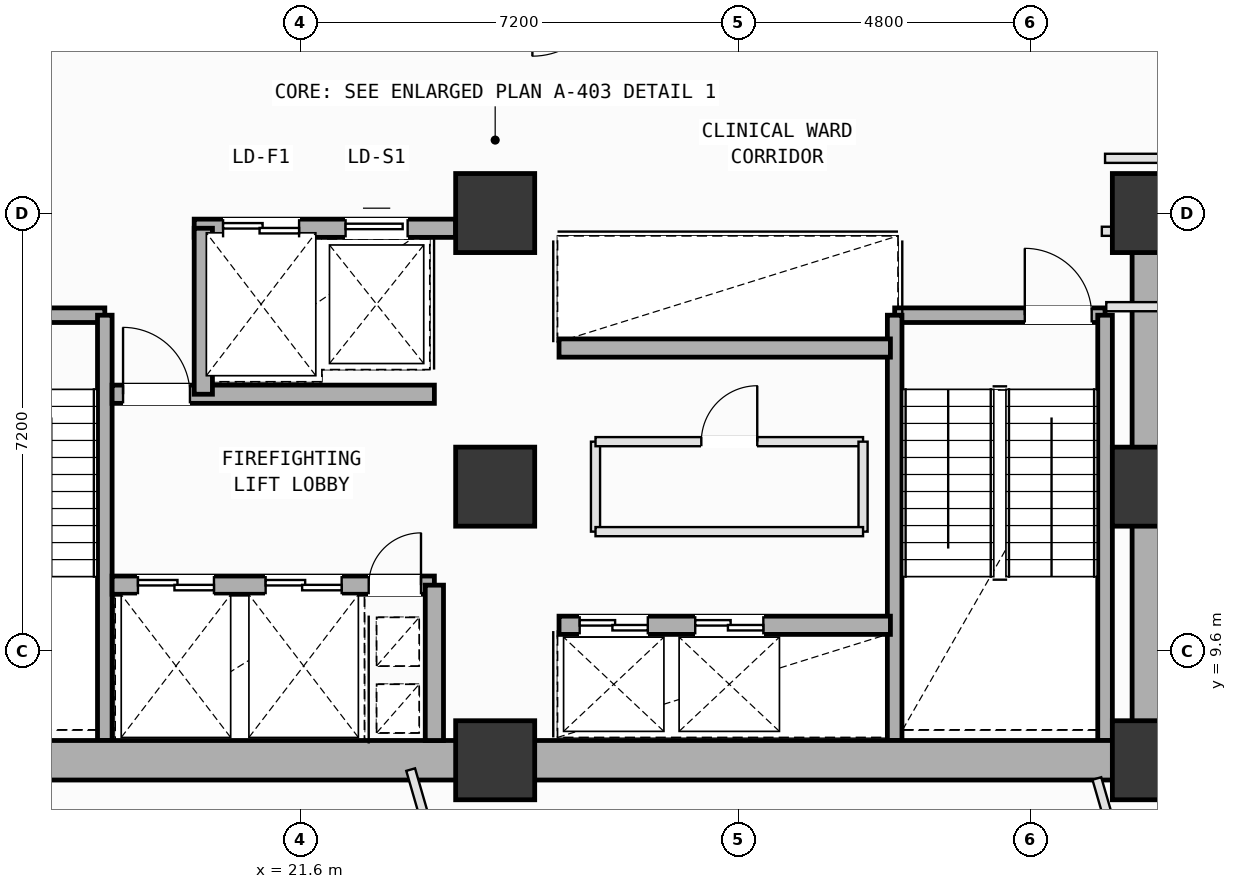
"""IFC4 building model, lengths in metres.
Left out: names, types, materials, properties, quantities, classifications, styles, units other than length and angle.
Written with IfcOpenShell. Run it as: python <this file> out.ifc"""

import sys

from ifc_helpers import new_model, si_unit, direction, frame, frame_2d, origin, origin_2d, place, context, subcontext, project, spatial, rectangle, extrude, element, fill, save


model = new_model("IFC4")
c1 = context("Model", 3, precision=1e-05, world=origin(), true_north=direction((0.0, 1.0)))
c2 = subcontext(c1, "Body", "Model", "MODEL_VIEW")
j1 = project(units=[si_unit("LENGTHUNIT", "METRE"), si_unit("PLANEANGLEUNIT", "RADIAN")], contexts=[c1])
p1 = place(None, origin())
s1 = spatial("IfcSite", under=j1, at=p1, CompositionType="ELEMENT")
p2 = place(p1, origin())
s2 = spatial("IfcBuilding", under=s1, at=p2, CompositionType="ELEMENT")
p3 = place(p2, frame((0.0, 0.0, 92.4)))
s3 = spatial("IfcBuildingStorey", under=s2, at=p3, CompositionType="ELEMENT", Elevation=92.4)
for number, where, z_axis, x_axis in (
    (1, (24.8, 7.8, 0.0), (0.0, 0.0, 1.0), (1.0, 0.0, 0.0)),
    (2, (24.8, 12.3, 0.0), (0.0, 0.0, 1.0), (1.0, 0.0, 0.0)),
    (3, (24.8, 16.8, 0.0), (0.0, 0.0, 1.0), (1.0, 0.0, 0.0)),
    (4, (35.6, 7.8, 0.0), (0.0, 0.0, 1.0), (1.0, 0.0, 0.0)),
    (5, (35.6, 12.3, 0.0), (0.0, 0.0, 1.0), (1.0, 0.0, 0.0)),
    (6, (35.6, 16.8, 0.0), (0.0, 0.0, 1.0), (1.0, 0.0, 0.0)),
):
    element("IfcColumn", number, at=place(p3, frame(where, z_axis=z_axis, x_axis=x_axis)), inside=s3, PredefinedType="COLUMN", context=c2, shape_type="SweptSolid", body=[
        extrude(rectangle(XDim=1.3, YDim=1.3, at=origin_2d()), origin(), (0.0, 0.0, 1.0), 4.0),
    ])
p4 = place(p3, frame((14.92, 15.12, 0.0), z_axis=(0.0, 0.0, 1.0), x_axis=(1.0, 0.0, 0.0)))
e7 = element("IfcWall", 7, at=p4, inside=s3, PredefinedType="SOLIDWALL", context=c2, shape_type="SweptSolid", body=[
    extrude(rectangle(XDim=3.46, YDim=0.24, at=frame_2d((1.73, 0.0))), origin(), (0.0, 0.0, 1.0), 3.78),
])
p5 = place(p4, frame((0.22, 0.0, 0.0)))
e8 = element("IfcOpeningElement", 8, at=p5, cuts=e7, PredefinedType="OPENING", context=c2, shape_type="SweptSolid", body=[
    extrude(rectangle(XDim=1.1, YDim=2.15, at=frame_2d((0.55, 1.075))), frame((0.0, 0.13, 0.0), z_axis=(0.0, -1.0, 0.0), x_axis=(1.0, 0.0, 0.0)), (0.0, 0.0, 1.0), 0.26),
])
p6 = place(p3, frame((18.38, 15.12, 0.0), z_axis=(0.0, 0.0, 1.0), x_axis=(0.0, -1.0, 0.0)))
e9 = element("IfcWall", 9, at=p6, inside=s3, PredefinedType="SOLIDWALL", context=c2, shape_type="SweptSolid", body=[
    extrude(rectangle(XDim=6.995, YDim=0.24, at=frame_2d((3.498, 0.0))), origin(), (0.0, 0.0, 1.0), 3.78),
])
p7 = place(p3, frame((31.37, 15.12, 0.0), z_axis=(0.0, 0.0, 1.0), x_axis=(1.0, 0.0, 0.0)))
e10 = element("IfcWall", 10, at=p7, inside=s3, PredefinedType="SOLIDWALL", context=c2, shape_type="SweptSolid", body=[
    extrude(rectangle(XDim=3.46, YDim=0.24, at=frame_2d((1.73, 0.0))), origin(), (0.0, 0.0, 1.0), 3.78),
])
p8 = place(p7, frame((2.14, 0.0, 0.0)))
e11 = element("IfcOpeningElement", 11, at=p8, cuts=e10, PredefinedType="OPENING", context=c2, shape_type="SweptSolid", body=[
    extrude(rectangle(XDim=1.1, YDim=2.15, at=frame_2d((0.55, 1.075))), frame((0.0, 0.13, 0.0), z_axis=(0.0, -1.0, 0.0), x_axis=(1.0, 0.0, 0.0)), (0.0, 0.0, 1.0), 0.26),
])
for number, where, z_axis, x_axis in (
    (12, (34.83, 15.12, 0.0), (0.0, 0.0, 1.0), (0.0, -1.0, 0.0)),
    (13, (31.37, 8.125, 0.0), (0.0, 0.0, 1.0), (0.0, 1.0, 0.0)),
):
    element("IfcWall", number, at=place(p3, frame(where, z_axis=z_axis, x_axis=x_axis)), inside=s3, PredefinedType="SOLIDWALL", context=c2, shape_type="SweptSolid", body=[
        extrude(rectangle(XDim=6.995, YDim=0.24, at=frame_2d((3.498, 0.0))), origin(), (0.0, 0.0, 1.0), 3.78),
    ])
for number, where, z_axis, x_axis in (
    (14, (14.0, 7.8, 0.0), (0.0, 0.0, 1.0), (1.0, 0.0, 0.0)),
    (15, (24.8, 7.8, 0.0), (0.0, 0.0, 1.0), (1.0, 0.0, 0.0)),
):
    element("IfcWall", number, at=place(p3, frame(where, z_axis=z_axis, x_axis=x_axis)), inside=s3, PredefinedType="SHEAR", context=c2, shape_type="SweptSolid", body=[
        extrude(rectangle(XDim=10.8, YDim=0.65, at=frame_2d((5.4, 0.0))), origin(), (0.0, 0.0, 1.0), 3.78),
    ])
p9 = place(p3, frame((35.6, 7.8, 0.0), z_axis=(0.0, 0.0, 1.0), x_axis=(0.0, 1.0, 0.0)))
e16 = element("IfcWall", 16, at=p9, inside=s3, PredefinedType="SHEAR", context=c2, shape_type="SweptSolid", body=[
    extrude(rectangle(XDim=9.0, YDim=0.65, at=frame_2d((4.5, 0.0))), origin(), (0.0, 0.0, 1.0), 3.78),
])
p10 = place(p3, frame((19.85, 16.55, 0.0), z_axis=(0.0, 0.0, 1.0), x_axis=(1.0, 0.0, 0.0)))
e17 = element("IfcWall", 17, at=p10, inside=s3, PredefinedType="SOLIDWALL", context=c2, shape_type="SweptSolid", body=[
    extrude(rectangle(XDim=4.3, YDim=0.3, at=frame_2d((2.15, 0.0))), origin(), (0.0, 0.0, 1.0), 3.78),
])
p11 = place(p10, frame((0.475, 0.0, 0.0)))
e18 = element("IfcOpeningElement", 18, at=p11, cuts=e17, PredefinedType="OPENING", context=c2, shape_type="SweptSolid", body=[
    extrude(rectangle(XDim=1.25, YDim=2.18, at=frame_2d((0.625, 1.09))), frame((0.0, 0.16, 0.0), z_axis=(0.0, -1.0, 0.0), x_axis=(1.0, 0.0, 0.0)), (0.0, 0.0, 1.0), 0.32),
])
p12 = place(p10, frame((2.49, 0.0, 0.0)))
e19 = element("IfcOpeningElement", 19, at=p12, cuts=e17, PredefinedType="OPENING", context=c2, shape_type="SweptSolid", body=[
    extrude(rectangle(XDim=1.02, YDim=2.12, at=frame_2d((0.51, 1.06))), frame((0.0, 0.16, 0.0), z_axis=(0.0, -1.0, 0.0), x_axis=(1.0, 0.0, 0.0)), (0.0, 0.0, 1.0), 0.32),
])
p13 = place(p3, frame((18.5, 10.68, 0.0), z_axis=(0.0, 0.0, 1.0), x_axis=(1.0, 0.0, 0.0)))
e20 = element("IfcWall", 20, at=p13, inside=s3, PredefinedType="SOLIDWALL", context=c2, shape_type="SweptSolid", body=[
    extrude(rectangle(XDim=5.3, YDim=0.3, at=frame_2d((2.65, 0.0))), origin(), (0.0, 0.0, 1.0), 3.78),
])
p14 = place(p13, frame((4.22, 0.0, 0.0)))
e21 = element("IfcOpeningElement", 21, at=p14, cuts=e20, PredefinedType="OPENING", context=c2, shape_type="SweptSolid", body=[
    extrude(rectangle(XDim=0.86, YDim=2.06, at=frame_2d((0.43, 1.03))), frame((0.0, 0.16, 0.0), z_axis=(0.0, -1.0, 0.0), x_axis=(1.0, 0.0, 0.0)), (0.0, 0.0, 1.0), 0.32),
])
p15 = place(p13, frame((0.425, 0.0, 0.0)))
e22 = element("IfcOpeningElement", 22, at=p15, cuts=e20, PredefinedType="OPENING", context=c2, shape_type="SweptSolid", body=[
    extrude(rectangle(XDim=1.25, YDim=2.18, at=frame_2d((0.625, 1.09))), frame((0.0, 0.16, 0.0), z_axis=(0.0, -1.0, 0.0), x_axis=(1.0, 0.0, 0.0)), (0.0, 0.0, 1.0), 0.32),
])
p16 = place(p13, frame((2.525, 0.0, 0.0)))
e23 = element("IfcOpeningElement", 23, at=p16, cuts=e20, PredefinedType="OPENING", context=c2, shape_type="SweptSolid", body=[
    extrude(rectangle(XDim=1.25, YDim=2.18, at=frame_2d((0.625, 1.09))), frame((0.0, 0.16, 0.0), z_axis=(0.0, -1.0, 0.0), x_axis=(1.0, 0.0, 0.0)), (0.0, 0.0, 1.0), 0.32),
])
p17 = place(p3, frame((18.5, 13.82, 0.0), z_axis=(0.0, 0.0, 1.0), x_axis=(1.0, 0.0, 0.0)))
e24 = element("IfcWall", 24, at=p17, inside=s3, PredefinedType="SOLIDWALL", context=c2, shape_type="SweptSolid", body=[
    extrude(rectangle(XDim=5.3, YDim=0.3, at=frame_2d((2.65, 0.0))), origin(), (0.0, 0.0, 1.0), 3.78),
])
p18 = place(p17, frame((0.18, 0.0, 0.0)))
e25 = element("IfcOpeningElement", 25, at=p18, cuts=e24, PredefinedType="OPENING", context=c2, shape_type="SweptSolid", body=[
    extrude(rectangle(XDim=1.1, YDim=2.15, at=frame_2d((0.55, 1.075))), frame((0.0, 0.16, 0.0), z_axis=(0.0, -1.0, 0.0), x_axis=(1.0, 0.0, 0.0)), (0.0, 0.0, 1.0), 0.32),
])
p19 = place(p3, frame((23.8, 8.125, 0.0), z_axis=(0.0, 0.0, 1.0), x_axis=(0.0, 1.0, 0.0)))
e26 = element("IfcWall", 26, at=p19, inside=s3, PredefinedType="SOLIDWALL", context=c2, shape_type="SweptSolid", body=[
    extrude(rectangle(XDim=2.555, YDim=0.3, at=frame_2d((1.277, 0.0))), origin(), (0.0, 0.0, 1.0), 3.78),
])
p20 = place(p3, frame((20.0, 13.82, 0.0), z_axis=(0.0, 0.0, 1.0), x_axis=(0.0, 1.0, 0.0)))
e27 = element("IfcWall", 27, at=p20, inside=s3, PredefinedType="SOLIDWALL", context=c2, shape_type="SweptSolid", body=[
    extrude(rectangle(XDim=2.73, YDim=0.3, at=frame_2d((1.365, 0.0))), origin(), (0.0, 0.0, 1.0), 3.78),
])
p21 = place(p3, frame((25.85, 10.02, 0.0), z_axis=(0.0, 0.0, 1.0), x_axis=(1.0, 0.0, 0.0)))
e28 = element("IfcWall", 28, at=p21, inside=s3, PredefinedType="SOLIDWALL", context=c2, shape_type="SweptSolid", body=[
    extrude(rectangle(XDim=5.45, YDim=0.3, at=frame_2d((2.725, 0.0))), origin(), (0.0, 0.0, 1.0), 3.78),
])
p22 = place(p21, frame((0.34, 0.0, 0.0)))
e29 = element("IfcOpeningElement", 29, at=p22, cuts=e28, PredefinedType="OPENING", context=c2, shape_type="SweptSolid", body=[
    extrude(rectangle(XDim=1.12, YDim=2.15, at=frame_2d((0.56, 1.075))), frame((0.0, 0.16, 0.0), z_axis=(0.0, -1.0, 0.0), x_axis=(1.0, 0.0, 0.0)), (0.0, 0.0, 1.0), 0.32),
])
p23 = place(p21, frame((2.24, 0.0, 0.0)))
e30 = element("IfcOpeningElement", 30, at=p23, cuts=e28, PredefinedType="OPENING", context=c2, shape_type="SweptSolid", body=[
    extrude(rectangle(XDim=1.12, YDim=2.15, at=frame_2d((0.56, 1.075))), frame((0.0, 0.16, 0.0), z_axis=(0.0, -1.0, 0.0), x_axis=(1.0, 0.0, 0.0)), (0.0, 0.0, 1.0), 0.32),
])
p24 = place(p3, frame((25.85, 14.58, 0.0), z_axis=(0.0, 0.0, 1.0), x_axis=(1.0, 0.0, 0.0)))
e31 = element("IfcWall", 31, at=p24, inside=s3, PredefinedType="SOLIDWALL", context=c2, shape_type="SweptSolid", body=[
    extrude(rectangle(XDim=5.45, YDim=0.3, at=frame_2d((2.725, 0.0))), origin(), (0.0, 0.0, 1.0), 3.78),
])
p25 = place(p3, frame((26.45, 11.56, 0.0), z_axis=(0.0, 0.0, 1.0), x_axis=(0.0, 1.0, 0.0)))
e32 = element("IfcWall", 32, at=p25, inside=s3, PredefinedType="PARTITIONING", context=c2, shape_type="SweptSolid", body=[
    extrude(rectangle(XDim=1.48, YDim=0.15, at=frame_2d((0.74, 0.0))), origin(), (0.0, 0.0, 1.0), 3.78),
])
p26 = place(p3, frame((26.45, 13.04, 0.0), z_axis=(0.0, 0.0, 1.0), x_axis=(1.0, 0.0, 0.0)))
e33 = element("IfcWall", 33, at=p26, inside=s3, PredefinedType="PARTITIONING", context=c2, shape_type="SweptSolid", body=[
    extrude(rectangle(XDim=4.4, YDim=0.15, at=frame_2d((2.2, 0.0))), origin(), (0.0, 0.0, 1.0), 3.78),
])
p27 = place(p26, frame((1.74, 0.0, 0.0)))
e34 = element("IfcOpeningElement", 34, at=p27, cuts=e33, PredefinedType="OPENING", context=c2, shape_type="SweptSolid", body=[
    extrude(rectangle(XDim=0.92, YDim=2.1, at=frame_2d((0.46, 1.05))), frame((0.0, 0.085, 0.0), z_axis=(0.0, -1.0, 0.0), x_axis=(1.0, 0.0, 0.0)), (0.0, 0.0, 1.0), 0.17),
])
p28 = place(p3, frame((30.85, 13.04, 0.0), z_axis=(0.0, 0.0, 1.0), x_axis=(0.0, -1.0, 0.0)))
e35 = element("IfcWall", 35, at=p28, inside=s3, PredefinedType="PARTITIONING", context=c2, shape_type="SweptSolid", body=[
    extrude(rectangle(XDim=1.48, YDim=0.15, at=frame_2d((0.74, 0.0))), origin(), (0.0, 0.0, 1.0), 3.78),
])
p29 = place(p3, frame((30.85, 11.56, 0.0), z_axis=(0.0, 0.0, 1.0), x_axis=(-1.0, 0.0, 0.0)))
e36 = element("IfcWall", 36, at=p29, inside=s3, PredefinedType="PARTITIONING", context=c2, shape_type="SweptSolid", body=[
    extrude(rectangle(XDim=4.4, YDim=0.15, at=frame_2d((2.2, 0.0))), origin(), (0.0, 0.0, 1.0), 3.78),
])
p30 = place(p3, frame((23.41, 7.646, 0.0), z_axis=(0.0, 0.0, 1.0), x_axis=(0.278025207954, -0.960573778396, 0.0)))
e37 = element("IfcWall", 37, at=p30, inside=s3, PredefinedType="PARTITIONING", context=c2, shape_type="SweptSolid", body=[
    extrude(rectangle(XDim=8.837, YDim=0.15, at=frame_2d((4.419, 0.0))), origin(), (0.0, 0.0, 1.0), 3.78),
])
p31 = place(p30, frame((4.145, 0.0, 0.0)))
e38 = element("IfcOpeningElement", 38, at=p31, cuts=e37, PredefinedType="OPENING", context=c2, shape_type="SweptSolid", body=[
    extrude(rectangle(XDim=0.86, YDim=2.06, at=frame_2d((0.43, 1.03))), frame((0.0, 0.085, 0.0), z_axis=(0.0, -1.0, 0.0), x_axis=(1.0, 0.0, 0.0)), (0.0, 0.0, 1.0), 0.17),
])
p32 = place(p3, frame((34.695, 7.5, 0.0), z_axis=(0.0, 0.0, 1.0), x_axis=(0.27804780228, -0.960567238483, 0.0)))
e39 = element("IfcWall", 39, at=p32, inside=s3, PredefinedType="PARTITIONING", context=c2, shape_type="SweptSolid", body=[
    extrude(rectangle(XDim=5.193, YDim=0.15, at=frame_2d((2.596, 0.0))), origin(), (0.0, 0.0, 1.0), 3.78),
])
p33 = place(p32, frame((2.167, 0.0, 0.0)))
e40 = element("IfcOpeningElement", 40, at=p33, cuts=e39, PredefinedType="OPENING", context=c2, shape_type="SweptSolid", body=[
    extrude(rectangle(XDim=0.86, YDim=2.06, at=frame_2d((0.43, 1.03))), frame((0.0, 0.085, 0.0), z_axis=(0.0, -1.0, 0.0), x_axis=(1.0, 0.0, 0.0)), (0.0, 0.0, 1.0), 0.17),
])
p34 = place(p3, frame((35.6, 7.5, 0.0), z_axis=(0.0, 0.0, 1.0), x_axis=(1.0, 0.0, 0.0)))
e41 = element("IfcWall", 41, at=p34, inside=s3, PredefinedType="PARTITIONING", context=c2, shape_type="SweptSolid", body=[
    extrude(rectangle(XDim=0.55, YDim=0.15, at=frame_2d((0.275, 0.0))), origin(), (0.0, 0.0, 1.0), 2.945),
])
p35 = place(p3, frame((36.15, 15.26, 0.0), z_axis=(0.0, 0.0, 1.0), x_axis=(-1.0, 0.0, 0.0)))
e42 = element("IfcWall", 42, at=p35, inside=s3, PredefinedType="PARTITIONING", context=c2, shape_type="SweptSolid", body=[
    extrude(rectangle(XDim=1.3, YDim=0.15, at=frame_2d((0.65, 0.0))), origin(), (0.0, 0.0, 1.0), 3.78),
])
p36 = place(p3, frame((34.777, 16.5, 0.0), z_axis=(0.0, 0.0, 1.0), x_axis=(1.0, 0.0, 0.0)))
e43 = element("IfcWall", 43, at=p36, inside=s3, PredefinedType="PARTITIONING", context=c2, shape_type="SweptSolid", body=[
    extrude(rectangle(XDim=1.723, YDim=0.15, at=frame_2d((0.861, 0.0))), origin(), (0.0, 0.0, 1.0), 2.965),
])
p37 = place(p3, frame((36.5, 17.7, 0.0), z_axis=(0.0, 0.0, 1.0), x_axis=(-1.0, 0.0, 0.0)))
e44 = element("IfcWall", 44, at=p37, inside=s3, PredefinedType="PARTITIONING", context=c2, shape_type="SweptSolid", body=[
    extrude(rectangle(XDim=1.67, YDim=0.15, at=frame_2d((0.835, 0.0))), origin(), (0.0, 0.0, 1.0), 3.78),
])
p38 = place(p8, origin())
e45 = element("IfcDoor", 45, at=p38, inside=s3, OperationType="SINGLE_SWING_LEFT", PredefinedType="DOOR", context=c2, shape_type="SweptSolid", body=[
    extrude(rectangle(XDim=1.1, YDim=2.15, at=frame_2d((0.55, 1.075))), frame((0.0, 0.025, 0.0), z_axis=(0.0, -1.0, 0.0), x_axis=(1.0, 0.0, 0.0)), (0.0, 0.0, 1.0), 0.05),
])
fill(e11, e45)
p39 = place(p14, origin())
e46 = element("IfcDoor", 46, at=p39, inside=s3, OperationType="SINGLE_SWING_RIGHT", PredefinedType="DOOR", context=c2, shape_type="SweptSolid", body=[
    extrude(rectangle(XDim=0.86, YDim=2.06, at=frame_2d((0.43, 1.03))), frame((0.0, 0.025, 0.0), z_axis=(0.0, -1.0, 0.0), x_axis=(1.0, 0.0, 0.0)), (0.0, 0.0, 1.0), 0.05),
])
fill(e21, e46)
p40 = place(p18, origin())
e47 = element("IfcDoor", 47, at=p40, inside=s3, OperationType="SINGLE_SWING_LEFT", PredefinedType="DOOR", context=c2, shape_type="SweptSolid", body=[
    extrude(rectangle(XDim=1.1, YDim=2.15, at=frame_2d((0.55, 1.075))), frame((0.0, 0.025, 0.0), z_axis=(0.0, -1.0, 0.0), x_axis=(1.0, 0.0, 0.0)), (0.0, 0.0, 1.0), 0.05),
])
fill(e25, e47)
p41 = place(p15, origin())
e48 = element("IfcDoor", 48, at=p41, inside=s3, OperationType="DOUBLE_DOOR_SLIDING", PredefinedType="DOOR", context=c2, shape_type="SweptSolid", body=[
    extrude(rectangle(XDim=1.25, YDim=2.18, at=frame_2d((0.625, 1.09))), frame((0.0, 0.025, 0.0), z_axis=(0.0, -1.0, 0.0), x_axis=(1.0, 0.0, 0.0)), (0.0, 0.0, 1.0), 0.05),
])
fill(e22, e48)
p42 = place(p16, origin())
e49 = element("IfcDoor", 49, at=p42, inside=s3, OperationType="DOUBLE_DOOR_SLIDING", PredefinedType="DOOR", context=c2, shape_type="SweptSolid", body=[
    extrude(rectangle(XDim=1.25, YDim=2.18, at=frame_2d((0.625, 1.09))), frame((0.0, 0.025, 0.0), z_axis=(0.0, -1.0, 0.0), x_axis=(1.0, 0.0, 0.0)), (0.0, 0.0, 1.0), 0.05),
])
fill(e23, e49)
p43 = place(p22, origin())
e50 = element("IfcDoor", 50, at=p43, inside=s3, OperationType="DOUBLE_DOOR_SLIDING", PredefinedType="DOOR", context=c2, shape_type="SweptSolid", body=[
    extrude(rectangle(XDim=1.12, YDim=2.15, at=frame_2d((0.56, 1.075))), frame((0.0, 0.025, 0.0), z_axis=(0.0, -1.0, 0.0), x_axis=(1.0, 0.0, 0.0)), (0.0, 0.0, 1.0), 0.05),
])
fill(e29, e50)
p44 = place(p23, origin())
e51 = element("IfcDoor", 51, at=p44, inside=s3, OperationType="DOUBLE_DOOR_SLIDING", PredefinedType="DOOR", context=c2, shape_type="SweptSolid", body=[
    extrude(rectangle(XDim=1.12, YDim=2.15, at=frame_2d((0.56, 1.075))), frame((0.0, 0.025, 0.0), z_axis=(0.0, -1.0, 0.0), x_axis=(1.0, 0.0, 0.0)), (0.0, 0.0, 1.0), 0.05),
])
fill(e30, e51)
p45 = place(p11, origin())
e52 = element("IfcDoor", 52, at=p45, inside=s3, OperationType="DOUBLE_DOOR_SLIDING", PredefinedType="DOOR", context=c2, shape_type="SweptSolid", body=[
    extrude(rectangle(XDim=1.25, YDim=2.18, at=frame_2d((0.625, 1.09))), frame((0.0, 0.025, 0.0), z_axis=(0.0, -1.0, 0.0), x_axis=(1.0, 0.0, 0.0)), (0.0, 0.0, 1.0), 0.05),
])
fill(e18, e52)
p46 = place(p12, origin())
e53 = element("IfcDoor", 53, at=p46, inside=s3, OperationType="SLIDING_TO_LEFT", PredefinedType="DOOR", context=c2, shape_type="SweptSolid", body=[
    extrude(rectangle(XDim=1.02, YDim=2.12, at=frame_2d((0.51, 1.06))), frame((0.0, 0.025, 0.0), z_axis=(0.0, -1.0, 0.0), x_axis=(1.0, 0.0, 0.0)), (0.0, 0.0, 1.0), 0.05),
])
fill(e19, e53)
p47 = place(p27, origin())
e54 = element("IfcDoor", 54, at=p47, inside=s3, OperationType="SINGLE_SWING_RIGHT", PredefinedType="DOOR", context=c2, shape_type="SweptSolid", body=[
    extrude(rectangle(XDim=0.92, YDim=2.1, at=frame_2d((0.46, 1.05))), frame((0.0, 0.025, 0.0), z_axis=(0.0, -1.0, 0.0), x_axis=(1.0, 0.0, 0.0)), (0.0, 0.0, 1.0), 0.05),
])
fill(e34, e54)
save(model, sys.argv[1])
